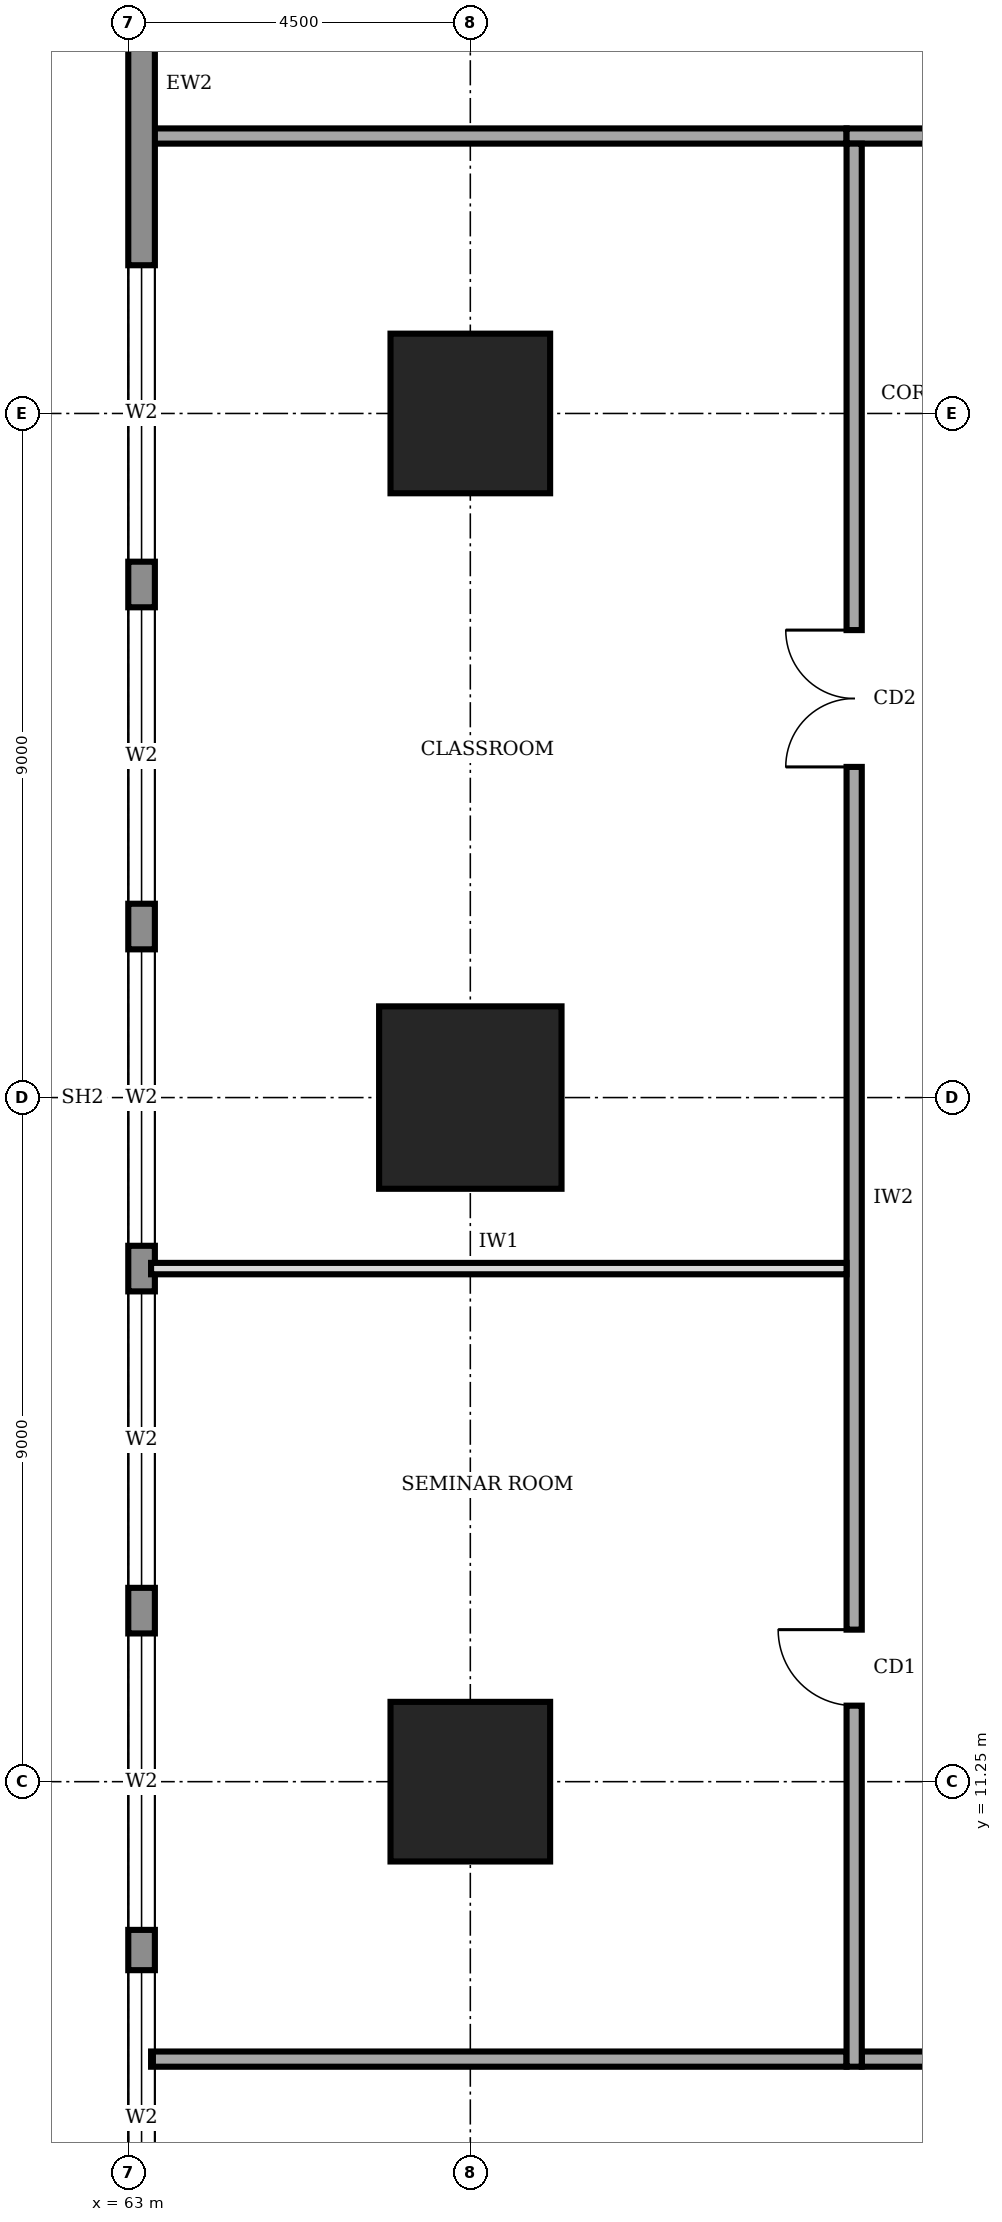
"""IFC4 building model, lengths in metres.
Left out: names, types, materials, properties, quantities, classifications, styles, units other than length and angle.
Written with IfcOpenShell. Run it as: python <this file> out.ifc"""

import sys

from ifc_helpers import new_model, si_unit, direction, frame, frame_2d, origin, origin_2d, place, context, subcontext, project, spatial, rectangle, extrude, element, fill, save


model = new_model("IFC4")
c1 = context("Model", 3, precision=1e-05, world=origin(), true_north=direction((0.0, 1.0)))
c2 = subcontext(c1, "Body", "Model", "MODEL_VIEW")
j1 = project(units=[si_unit("LENGTHUNIT", "METRE"), si_unit("PLANEANGLEUNIT", "RADIAN")], contexts=[c1])
p1 = place(None, origin())
s1 = spatial("IfcSite", under=j1, at=p1, CompositionType="ELEMENT")
p2 = place(p1, origin())
s2 = spatial("IfcBuilding", under=s1, at=p2, CompositionType="ELEMENT")
p3 = place(p2, frame((0.0, 0.0, 61.0)))
s3 = spatial("IfcBuildingStorey", under=s2, at=p3, CompositionType="ELEMENT", Elevation=61.0)
p4 = place(p3, frame((67.5, 11.25, 0.0), z_axis=(0.0, 0.0, 1.0), x_axis=(1.0, 0.0, 0.0)))
e1 = element("IfcColumn", 1, at=p4, inside=s3, PredefinedType="COLUMN", context=c2, shape_type="SweptSolid", body=[
    extrude(rectangle(XDim=2.1, YDim=2.1, at=origin_2d()), origin(), (0.0, 0.0, 1.0), 4.0),
])
p5 = place(p3, frame((67.5, 20.25, 0.0), z_axis=(0.0, 0.0, 1.0), x_axis=(1.0, 0.0, 0.0)))
e2 = element("IfcColumn", 2, at=p5, inside=s3, PredefinedType="COLUMN", context=c2, shape_type="SweptSolid", body=[
    extrude(rectangle(XDim=2.4, YDim=2.4, at=origin_2d()), origin(), (0.0, 0.0, 1.0), 4.0),
])
p6 = place(p3, frame((67.5, 29.25, 0.0), z_axis=(0.0, 0.0, 1.0), x_axis=(1.0, 0.0, 0.0)))
e3 = element("IfcColumn", 3, at=p6, inside=s3, PredefinedType="COLUMN", context=c2, shape_type="SweptSolid", body=[
    extrude(rectangle(XDim=2.1, YDim=2.1, at=origin_2d()), origin(), (0.0, 0.0, 1.0), 4.0),
])
p7 = place(p3, frame((63.175, 35.98, 0.0), z_axis=(0.0, 0.0, 1.0), x_axis=(0.0, -1.0, 0.0)))
e4 = element("IfcWall", 4, at=p7, inside=s3, PredefinedType="STANDARD", context=c2, shape_type="SweptSolid", body=[
    extrude(rectangle(XDim=31.46, YDim=0.35, at=frame_2d((15.73, 0.0))), origin(), (0.0, 0.0, 1.0), 3.75),
])
p8 = place(p7, frame((27.21, 0.0, 0.6)))
e5 = element("IfcOpeningElement", 5, at=p8, cuts=e4, PredefinedType="OPENING", context=c2, shape_type="SweptSolid", body=[
    extrude(rectangle(XDim=3.9, YDim=2.6, at=frame_2d((1.95, 1.3))), frame((0.0, 0.185, 0.0), z_axis=(0.0, -1.0, 0.0), x_axis=(1.0, 0.0, 0.0)), (0.0, 0.0, 1.0), 0.37),
])
p9 = place(p7, frame((22.78, 0.0, 0.6)))
e6 = element("IfcOpeningElement", 6, at=p9, cuts=e4, PredefinedType="OPENING", context=c2, shape_type="SweptSolid", body=[
    extrude(rectangle(XDim=3.9, YDim=2.6, at=frame_2d((1.95, 1.3))), frame((0.0, 0.185, 0.0), z_axis=(0.0, -1.0, 0.0), x_axis=(1.0, 0.0, 0.0)), (0.0, 0.0, 1.0), 0.37),
])
p10 = place(p7, frame((18.28, 0.0, 0.6)))
e7 = element("IfcOpeningElement", 7, at=p10, cuts=e4, PredefinedType="OPENING", context=c2, shape_type="SweptSolid", body=[
    extrude(rectangle(XDim=3.9, YDim=2.6, at=frame_2d((1.95, 1.3))), frame((0.0, 0.185, 0.0), z_axis=(0.0, -1.0, 0.0), x_axis=(1.0, 0.0, 0.0)), (0.0, 0.0, 1.0), 0.37),
])
p11 = place(p7, frame((13.78, 0.0, 0.6)))
e8 = element("IfcOpeningElement", 8, at=p11, cuts=e4, PredefinedType="OPENING", context=c2, shape_type="SweptSolid", body=[
    extrude(rectangle(XDim=3.9, YDim=2.6, at=frame_2d((1.95, 1.3))), frame((0.0, 0.185, 0.0), z_axis=(0.0, -1.0, 0.0), x_axis=(1.0, 0.0, 0.0)), (0.0, 0.0, 1.0), 0.37),
])
p12 = place(p7, frame((9.28, 0.0, 0.6)))
e9 = element("IfcOpeningElement", 9, at=p12, cuts=e4, PredefinedType="OPENING", context=c2, shape_type="SweptSolid", body=[
    extrude(rectangle(XDim=3.9, YDim=2.6, at=frame_2d((1.95, 1.3))), frame((0.0, 0.185, 0.0), z_axis=(0.0, -1.0, 0.0), x_axis=(1.0, 0.0, 0.0)), (0.0, 0.0, 1.0), 0.37),
])
p13 = place(p7, frame((4.78, 0.0, 0.6)))
e10 = element("IfcOpeningElement", 10, at=p13, cuts=e4, PredefinedType="OPENING", context=c2, shape_type="SweptSolid", body=[
    extrude(rectangle(XDim=3.9, YDim=2.6, at=frame_2d((1.95, 1.3))), frame((0.0, 0.185, 0.0), z_axis=(0.0, -1.0, 0.0), x_axis=(1.0, 0.0, 0.0)), (0.0, 0.0, 1.0), 0.37),
])
p14 = place(p3, frame((72.65, 7.6, 0.0), z_axis=(0.0, 0.0, 1.0), x_axis=(1.0, 0.0, 0.0)))
e11 = element("IfcWall", 11, at=p14, inside=s3, PredefinedType="SOLIDWALL", context=c2, shape_type="SweptSolid", body=[
    extrude(rectangle(XDim=16.9, YDim=0.2, at=frame_2d((8.45, 0.0))), origin(), (0.0, 0.0, 1.0), 3.75),
])
p15 = place(p14, frame((3.175, 0.0, 0.0)))
e12 = element("IfcOpeningElement", 12, at=p15, cuts=e11, PredefinedType="OPENING", context=c2, shape_type="SweptSolid", body=[
    extrude(rectangle(XDim=1.8, YDim=2.1, at=frame_2d((0.9, 1.05))), frame((0.0, 0.11, 0.0), z_axis=(0.0, -1.0, 0.0), x_axis=(1.0, 0.0, 0.0)), (0.0, 0.0, 1.0), 0.22),
])
p16 = place(p14, frame((10.1, 0.0, 0.0)))
e13 = element("IfcOpeningElement", 13, at=p16, cuts=e11, PredefinedType="OPENING", context=c2, shape_type="SweptSolid", body=[
    extrude(rectangle(XDim=1.0, YDim=2.1, at=frame_2d((0.5, 1.05))), frame((0.0, 0.11, 0.0), z_axis=(0.0, -1.0, 0.0), x_axis=(1.0, 0.0, 0.0)), (0.0, 0.0, 1.0), 0.22),
])
p17 = place(p14, frame((14.375, 0.0, 0.0)))
e14 = element("IfcOpeningElement", 14, at=p17, cuts=e11, PredefinedType="OPENING", context=c2, shape_type="SweptSolid", body=[
    extrude(rectangle(XDim=1.0, YDim=2.1, at=frame_2d((0.5, 1.05))), frame((0.0, 0.11, 0.0), z_axis=(0.0, -1.0, 0.0), x_axis=(1.0, 0.0, 0.0)), (0.0, 0.0, 1.0), 0.22),
])
p18 = place(p3, frame((89.35, 32.9, 0.0), z_axis=(0.0, 0.0, 1.0), x_axis=(-1.0, 0.0, 0.0)))
e15 = element("IfcWall", 15, at=p18, inside=s3, PredefinedType="SOLIDWALL", context=c2, shape_type="SweptSolid", body=[
    extrude(rectangle(XDim=16.9, YDim=0.2, at=frame_2d((8.45, 0.0))), origin(), (0.0, 0.0, 1.0), 3.75),
])
p19 = place(p18, frame((14.375, 0.0, 0.0)))
e16 = element("IfcOpeningElement", 16, at=p19, cuts=e15, PredefinedType="OPENING", context=c2, shape_type="SweptSolid", body=[
    extrude(rectangle(XDim=1.0, YDim=2.1, at=frame_2d((0.5, 1.05))), frame((0.0, 0.11, 0.0), z_axis=(0.0, -1.0, 0.0), x_axis=(1.0, 0.0, 0.0)), (0.0, 0.0, 1.0), 0.22),
])
p20 = place(p18, frame((7.85, 0.0, 0.0)))
e17 = element("IfcOpeningElement", 17, at=p20, cuts=e15, PredefinedType="OPENING", context=c2, shape_type="SweptSolid", body=[
    extrude(rectangle(XDim=1.0, YDim=2.1, at=frame_2d((0.5, 1.05))), frame((0.0, 0.11, 0.0), z_axis=(0.0, -1.0, 0.0), x_axis=(1.0, 0.0, 0.0)), (0.0, 0.0, 1.0), 0.22),
])
p21 = place(p18, frame((1.325, 0.0, 0.0)))
e18 = element("IfcOpeningElement", 18, at=p21, cuts=e15, PredefinedType="OPENING", context=c2, shape_type="SweptSolid", body=[
    extrude(rectangle(XDim=1.0, YDim=2.1, at=frame_2d((0.5, 1.05))), frame((0.0, 0.11, 0.0), z_axis=(0.0, -1.0, 0.0), x_axis=(1.0, 0.0, 0.0)), (0.0, 0.0, 1.0), 0.22),
])
p22 = place(p3, frame((72.55, 32.8, 0.0), z_axis=(0.0, 0.0, 1.0), x_axis=(0.0, -1.0, 0.0)))
e19 = element("IfcWall", 19, at=p22, inside=s3, PredefinedType="SOLIDWALL", context=c2, shape_type="SweptSolid", body=[
    extrude(rectangle(XDim=25.3, YDim=0.2, at=frame_2d((12.65, 0.0))), origin(), (0.0, 0.0, 1.0), 3.75),
])
p23 = place(p22, frame((19.55, 0.0, 0.0)))
e20 = element("IfcOpeningElement", 20, at=p23, cuts=e19, PredefinedType="OPENING", context=c2, shape_type="SweptSolid", body=[
    extrude(rectangle(XDim=1.0, YDim=2.1, at=frame_2d((0.5, 1.05))), frame((0.0, 0.11, 0.0), z_axis=(0.0, -1.0, 0.0), x_axis=(1.0, 0.0, 0.0)), (0.0, 0.0, 1.0), 0.22),
])
p24 = place(p22, frame((6.4, 0.0, 0.0)))
e21 = element("IfcOpeningElement", 21, at=p24, cuts=e19, PredefinedType="OPENING", context=c2, shape_type="SweptSolid", body=[
    extrude(rectangle(XDim=1.8, YDim=2.1, at=frame_2d((0.9, 1.05))), frame((0.0, 0.11, 0.0), z_axis=(0.0, -1.0, 0.0), x_axis=(1.0, 0.0, 0.0)), (0.0, 0.0, 1.0), 0.22),
])
for number, where, z_axis, x_axis in (
    (22, (63.3, 7.6, 0.0), (0.0, 0.0, 1.0), (1.0, 0.0, 0.0)),
    (23, (63.3, 32.9, 0.0), (0.0, 0.0, 1.0), (1.0, 0.0, 0.0)),
):
    element("IfcWall", number, at=place(p3, frame(where, z_axis=z_axis, x_axis=x_axis)), inside=s3, PredefinedType="SOLIDWALL", context=c2, shape_type="SweptSolid", body=[
        extrude(rectangle(XDim=9.15, YDim=0.2, at=frame_2d((4.575, 0.0))), origin(), (0.0, 0.0, 1.0), 3.75),
    ])
p25 = place(p3, frame((63.3, 18.0, 0.0), z_axis=(0.0, 0.0, 1.0), x_axis=(1.0, 0.0, 0.0)))
e24 = element("IfcWall", 24, at=p25, inside=s3, PredefinedType="PARTITIONING", context=c2, shape_type="SweptSolid", body=[
    extrude(rectangle(XDim=9.15, YDim=0.15, at=frame_2d((4.575, 0.0))), origin(), (0.0, 0.0, 1.0), 3.75),
])
p26 = place(p8, origin())
e25 = element("IfcWindow", 25, at=p26, inside=s3, PartitioningType="SINGLE_PANEL", PredefinedType="WINDOW", context=c2, shape_type="SweptSolid", body=[
    extrude(rectangle(XDim=3.9, YDim=2.6, at=frame_2d((1.95, 1.3))), frame((0.0, 0.03, 0.0), z_axis=(0.0, -1.0, 0.0), x_axis=(1.0, 0.0, 0.0)), (0.0, 0.0, 1.0), 0.06),
])
fill(e5, e25)
p27 = place(p9, origin())
e26 = element("IfcWindow", 26, at=p27, inside=s3, PartitioningType="SINGLE_PANEL", PredefinedType="WINDOW", context=c2, shape_type="SweptSolid", body=[
    extrude(rectangle(XDim=3.9, YDim=2.6, at=frame_2d((1.95, 1.3))), frame((0.0, 0.03, 0.0), z_axis=(0.0, -1.0, 0.0), x_axis=(1.0, 0.0, 0.0)), (0.0, 0.0, 1.0), 0.06),
])
fill(e6, e26)
p28 = place(p10, origin())
e27 = element("IfcWindow", 27, at=p28, inside=s3, PartitioningType="SINGLE_PANEL", PredefinedType="WINDOW", context=c2, shape_type="SweptSolid", body=[
    extrude(rectangle(XDim=3.9, YDim=2.6, at=frame_2d((1.95, 1.3))), frame((0.0, 0.03, 0.0), z_axis=(0.0, -1.0, 0.0), x_axis=(1.0, 0.0, 0.0)), (0.0, 0.0, 1.0), 0.06),
])
fill(e7, e27)
p29 = place(p11, origin())
e28 = element("IfcWindow", 28, at=p29, inside=s3, PartitioningType="SINGLE_PANEL", PredefinedType="WINDOW", context=c2, shape_type="SweptSolid", body=[
    extrude(rectangle(XDim=3.9, YDim=2.6, at=frame_2d((1.95, 1.3))), frame((0.0, 0.03, 0.0), z_axis=(0.0, -1.0, 0.0), x_axis=(1.0, 0.0, 0.0)), (0.0, 0.0, 1.0), 0.06),
])
fill(e8, e28)
p30 = place(p12, origin())
e29 = element("IfcWindow", 29, at=p30, inside=s3, PartitioningType="SINGLE_PANEL", PredefinedType="WINDOW", context=c2, shape_type="SweptSolid", body=[
    extrude(rectangle(XDim=3.9, YDim=2.6, at=frame_2d((1.95, 1.3))), frame((0.0, 0.03, 0.0), z_axis=(0.0, -1.0, 0.0), x_axis=(1.0, 0.0, 0.0)), (0.0, 0.0, 1.0), 0.06),
])
fill(e9, e29)
p31 = place(p13, origin())
e30 = element("IfcWindow", 30, at=p31, inside=s3, PartitioningType="SINGLE_PANEL", PredefinedType="WINDOW", context=c2, shape_type="SweptSolid", body=[
    extrude(rectangle(XDim=3.9, YDim=2.6, at=frame_2d((1.95, 1.3))), frame((0.0, 0.03, 0.0), z_axis=(0.0, -1.0, 0.0), x_axis=(1.0, 0.0, 0.0)), (0.0, 0.0, 1.0), 0.06),
])
fill(e10, e30)
p32 = place(p23, frame((1.0, 0.0, 0.0), z_axis=(0.0, 0.0, 1.0), x_axis=(-1.0, 0.0, 0.0)))
e31 = element("IfcDoor", 31, at=p32, inside=s3, OperationType="SINGLE_SWING_RIGHT", PredefinedType="DOOR", context=c2, shape_type="SweptSolid", body=[
    extrude(rectangle(XDim=1.0, YDim=2.1, at=frame_2d((0.5, 1.05))), frame((0.0, 0.025, 0.0), z_axis=(0.0, -1.0, 0.0), x_axis=(1.0, 0.0, 0.0)), (0.0, 0.0, 1.0), 0.05),
])
fill(e20, e31)
p33 = place(p24, frame((1.8, 0.0, 0.0), z_axis=(0.0, 0.0, 1.0), x_axis=(-1.0, 0.0, 0.0)))
e32 = element("IfcDoor", 32, at=p33, inside=s3, OperationType="DOUBLE_DOOR_SINGLE_SWING", PredefinedType="DOOR", context=c2, shape_type="SweptSolid", body=[
    extrude(rectangle(XDim=1.8, YDim=2.1, at=frame_2d((0.9, 1.05))), frame((0.0, 0.025, 0.0), z_axis=(0.0, -1.0, 0.0), x_axis=(1.0, 0.0, 0.0)), (0.0, 0.0, 1.0), 0.05),
])
fill(e21, e32)
save(model, sys.argv[1])
